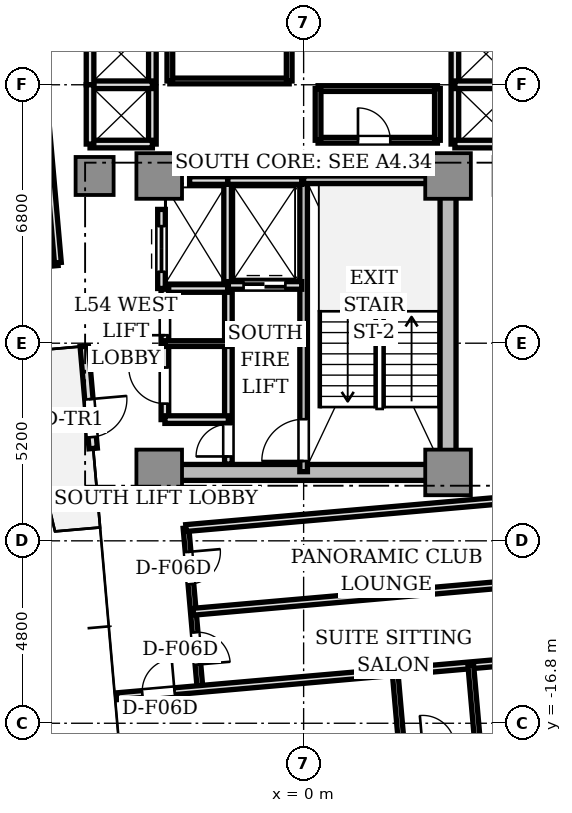
"""IFC4 building model, lengths in metres.
Left out: names, types, materials, properties, quantities, classifications, styles, units other than length and angle.
Written with IfcOpenShell. Run it as: python <this file> out.ifc"""

import sys

from ifc_helpers import new_model, si_unit, direction, frame, frame_2d, origin, origin_2d, place, context, subcontext, project, spatial, rectangle, extrude, source, transform, mapped, element, fill, save


model = new_model("IFC4")
c1 = context("Model", 3, precision=1e-05, world=origin(), true_north=direction((0.0, 1.0)))
c2 = subcontext(c1, "Body", "Model", "MODEL_VIEW")
j1 = project(units=[si_unit("LENGTHUNIT", "METRE"), si_unit("PLANEANGLEUNIT", "RADIAN")], contexts=[c1])
p1 = place(None, origin())
s1 = spatial("IfcSite", under=j1, at=p1, CompositionType="ELEMENT")
p2 = place(p1, origin())
s2 = spatial("IfcBuilding", under=s1, at=p2, CompositionType="ELEMENT")
p3 = place(p2, frame((0.0, 0.0, 195.3)))
s3 = spatial("IfcBuildingStorey", under=s2, at=p3, CompositionType="ELEMENT", Elevation=195.3)
p4 = place(p3, frame((-3.55, -10.2, 0.0), z_axis=(0.0, 0.0, 1.0), x_axis=(1.0, 0.0, 0.0)))
e1 = element("IfcWall", 1, at=p4, inside=s3, PredefinedType="SHEAR", context=c2, shape_type="SweptSolid", body=[
    extrude(rectangle(XDim=7.1, YDim=0.42, at=frame_2d((3.55, 0.0))), origin(), (0.0, 0.0, 1.0), 3.11),
])
p5 = place(p3, frame((3.8, -9.75, 0.0), z_axis=(0.0, 0.0, 1.0), x_axis=(0.0, 1.0, 0.0)))
e2 = element("IfcWall", 2, at=p5, inside=s3, PredefinedType="SHEAR", context=c2, shape_type="SweptSolid", body=[
    extrude(rectangle(XDim=6.9, YDim=0.42, at=frame_2d((3.45, 0.0))), origin(), (0.0, 0.0, 1.0), 3.11),
])
m1 = source(origin(), c2, "Body", "SweptSolid", [
    extrude(rectangle(XDim=1.2, YDim=1.2, at=origin_2d()), origin(), (0.0, 0.0, 1.0), 3.11),
])
for number, where, z_axis, x_axis in (
    (3, (-3.8, -2.4, 0.0), (0.0, 0.0, 1.0), (1.0, 0.0, 0.0)),
    (4, (3.8, -2.4, 0.0), (0.0, 0.0, 1.0), (1.0, 0.0, 0.0)),
    (5, (-3.8, -10.2, 0.0), (0.0, 0.0, 1.0), (1.0, 0.0, 0.0)),
    (6, (3.8, -10.2, 0.0), (0.0, 0.0, 1.0), (1.0, 0.0, 0.0)),
):
    element("IfcColumn", number, at=place(p3, frame(where, z_axis=z_axis, x_axis=x_axis)), inside=s3, PredefinedType="COLUMN", context=c2, shape_type="MappedRepresentation", body=[
        mapped(m1, transform((0.0, 0.0, 0.0), scale=1.0)),
    ])
m2 = source(origin(), c2, "Body", "SweptSolid", [
    extrude(rectangle(XDim=1.0, YDim=1.0, at=origin_2d()), origin(), (0.0, 0.0, 1.0), 3.11),
])
p6 = place(p3, frame((-5.5, -2.4, 0.0), z_axis=(0.0, 0.0, 1.0), x_axis=(1.0, 0.0, 0.0)))
e7 = element("IfcColumn", 7, at=p6, inside=s3, PredefinedType="COLUMN", context=c2, shape_type="MappedRepresentation", body=[
    mapped(m2, transform((0.0, 0.0, 0.0), scale=1.0)),
])
p7 = place(p3, frame((-5.772, -6.879, 0.0), z_axis=(0.0, 0.0, 1.0), x_axis=(0.087168071984, -0.996193619346, 0.0)))
e8 = element("IfcWall", 8, at=p7, inside=s3, PredefinedType="STANDARD", context=c2, shape_type="SweptSolid", body=[
    extrude(rectangle(XDim=2.7, YDim=0.22, at=frame_2d((1.35, 0.0))), origin(), (0.0, 0.0, 1.0), 3.11),
])
p8 = place(p7, frame((1.4, 0.0, 0.0)))
e9 = element("IfcOpeningElement", 9, at=p8, cuts=e8, PredefinedType="OPENING", context=c2, shape_type="SweptSolid", body=[
    extrude(rectangle(XDim=1.0, YDim=2.2, at=frame_2d((0.5, 1.1))), frame((0.0, 0.12, 0.0), z_axis=(0.0, -1.0, 0.0), x_axis=(1.0, 0.0, 0.0)), (0.0, 0.0, 1.0), 0.24),
])
p9 = place(p3, frame((0.0, -10.18, 0.0), z_axis=(0.0, 0.0, 1.0), x_axis=(0.0, 1.0, 0.0)))
e10 = element("IfcWall", 10, at=p9, inside=s3, PredefinedType="SOLIDWALL", context=c2, shape_type="SweptSolid", body=[
    extrude(rectangle(XDim=7.68, YDim=0.2, at=frame_2d((3.84, 0.0))), origin(), (0.0, 0.0, 1.0), 3.11),
])
p10 = place(p9, frame((0.28, 0.0, 0.0)))
e11 = element("IfcOpeningElement", 11, at=p10, cuts=e10, PredefinedType="OPENING", context=c2, shape_type="SweptSolid", body=[
    extrude(rectangle(XDim=1.1, YDim=2.15, at=frame_2d((0.55, 1.075))), frame((0.0, 0.11, 0.0), z_axis=(0.0, -1.0, 0.0), x_axis=(1.0, 0.0, 0.0)), (0.0, 0.0, 1.0), 0.22),
])
p11 = place(p3, frame((0.0, -2.5, 0.0), z_axis=(0.0, 0.0, 1.0), x_axis=(1.0, 0.0, 0.0)))
e12 = element("IfcWall", 12, at=p11, inside=s3, PredefinedType="SOLIDWALL", context=c2, shape_type="SweptSolid", body=[
    extrude(rectangle(XDim=3.72, YDim=0.2, at=frame_2d((1.86, 0.0))), origin(), (0.0, 0.0, 1.0), 3.11),
])
p12 = place(p3, frame((-1.98, -9.98, 0.0), z_axis=(0.0, 0.0, 1.0), x_axis=(0.0, 1.0, 0.0)))
e13 = element("IfcWall", 13, at=p12, inside=s3, PredefinedType="SOLIDWALL", context=c2, shape_type="SweptSolid", body=[
    extrude(rectangle(XDim=4.66, YDim=0.2, at=frame_2d((2.33, 0.0))), origin(), (0.0, 0.0, 1.0), 2.66),
])
p13 = place(p12, frame((0.2, 0.0, 0.0)))
e14 = element("IfcOpeningElement", 14, at=p13, cuts=e13, PredefinedType="OPENING", context=c2, shape_type="SweptSolid", body=[
    extrude(rectangle(XDim=0.85, YDim=2.1, at=frame_2d((0.425, 1.05))), frame((0.0, 0.11, 0.0), z_axis=(0.0, -1.0, 0.0), x_axis=(1.0, 0.0, 0.0)), (0.0, 0.0, 1.0), 0.22),
])
p14 = place(p3, frame((-2.0, -5.28, 0.0), z_axis=(0.0, 0.0, 1.0), x_axis=(0.0, 1.0, 0.0)))
e15 = element("IfcWall", 15, at=p14, inside=s3, PredefinedType="SOLIDWALL", context=c2, shape_type="SweptSolid", body=[
    extrude(rectangle(XDim=2.78, YDim=0.2, at=frame_2d((1.39, 0.0))), origin(), (0.0, 0.0, 1.0), 2.66),
])
p15 = place(p3, frame((-2.0, -2.52, 0.0), z_axis=(0.0, 0.0, 1.0), x_axis=(1.0, 0.0, 0.0)))
e16 = element("IfcWall", 16, at=p15, inside=s3, PredefinedType="SOLIDWALL", context=c2, shape_type="SweptSolid", body=[
    extrude(rectangle(XDim=1.95, YDim=0.2, at=frame_2d((0.975, 0.0))), origin(), (0.0, 0.0, 1.0), 2.66),
])
p16 = place(p3, frame((-1.98, -5.28, 0.0), z_axis=(0.0, 0.0, 1.0), x_axis=(1.0, 0.0, 0.0)))
e17 = element("IfcWall", 17, at=p16, inside=s3, PredefinedType="SOLIDWALL", context=c2, shape_type="SweptSolid", body=[
    extrude(rectangle(XDim=1.93, YDim=0.2, at=frame_2d((0.965, 0.0))), origin(), (0.0, 0.0, 1.0), 2.66),
])
p17 = place(p16, frame((0.4, 0.0, 0.0)))
e18 = element("IfcOpeningElement", 18, at=p17, cuts=e17, PredefinedType="OPENING", context=c2, shape_type="SweptSolid", body=[
    extrude(rectangle(XDim=1.1, YDim=2.2, at=frame_2d((0.55, 1.1))), frame((0.0, 0.11, 0.0), z_axis=(0.0, -1.0, 0.0), x_axis=(1.0, 0.0, 0.0)), (0.0, 0.0, 1.0), 0.22),
])
p18 = place(p3, frame((-3.0, -2.52, 0.0), z_axis=(0.0, 0.0, 1.0), x_axis=(1.0, 0.0, 0.0)))
e19 = element("IfcWall", 19, at=p18, inside=s3, PredefinedType="SOLIDWALL", context=c2, shape_type="SweptSolid", body=[
    extrude(rectangle(XDim=1.0, YDim=0.2, at=frame_2d((0.5, 0.0))), origin(), (0.0, 0.0, 1.0), 2.66),
])
p19 = place(p3, frame((-3.74, -5.36, 0.0), z_axis=(0.0, 0.0, 1.0), x_axis=(1.0, 0.0, 0.0)))
e20 = element("IfcWall", 20, at=p19, inside=s3, PredefinedType="SOLIDWALL", context=c2, shape_type="SweptSolid", body=[
    extrude(rectangle(XDim=1.74, YDim=0.2, at=frame_2d((0.87, 0.0))), origin(), (0.0, 0.0, 1.0), 2.66),
])
p20 = place(p3, frame((-3.74, -5.36, 0.0), z_axis=(0.0, 0.0, 1.0), x_axis=(0.0, 1.0, 0.0)))
e21 = element("IfcWall", 21, at=p20, inside=s3, PredefinedType="SOLIDWALL", context=c2, shape_type="SweptSolid", body=[
    extrude(rectangle(XDim=2.08, YDim=0.2, at=frame_2d((1.04, 0.0))), origin(), (0.0, 0.0, 1.0), 2.66),
])
p21 = place(p20, frame((0.44, 0.0, 0.0)))
e22 = element("IfcOpeningElement", 22, at=p21, cuts=e21, PredefinedType="OPENING", context=c2, shape_type="SweptSolid", body=[
    extrude(rectangle(XDim=1.2, YDim=2.2, at=frame_2d((0.6, 1.1))), frame((0.0, 0.11, 0.0), z_axis=(0.0, -1.0, 0.0), x_axis=(1.0, 0.0, 0.0)), (0.0, 0.0, 1.0), 0.22),
])
p22 = place(p3, frame((3.98, -1.56, 0.0), z_axis=(0.0, 0.0, 1.0), x_axis=(0.0, 1.0, 0.0)))
e23 = element("IfcWall", 23, at=p22, inside=s3, PredefinedType="SOLIDWALL", context=c2, shape_type="SweptSolid", body=[
    extrude(rectangle(XDim=3.12, YDim=0.2, at=frame_2d((1.56, 0.0))), origin(), (0.0, 0.0, 1.0), 2.28),
])
for number, where, z_axis, x_axis in (
    (24, (3.98, -1.56, 0.0), (0.0, 0.0, 1.0), (1.0, 0.0, 0.0)),
    (25, (3.98, 0.0, 0.0), (0.0, 0.0, 1.0), (1.0, 0.0, 0.0)),
):
    element("IfcWall", number, at=place(p3, frame(where, z_axis=z_axis, x_axis=x_axis)), inside=s3, PredefinedType="SOLIDWALL", context=c2, shape_type="SweptSolid", body=[
        extrude(rectangle(XDim=1.64, YDim=0.2, at=frame_2d((0.82, 0.0))), origin(), (0.0, 0.0, 1.0), 2.66),
    ])
p23 = place(p3, frame((-3.98, -1.56, 0.0), z_axis=(0.0, 0.0, 1.0), x_axis=(0.0, 1.0, 0.0)))
e26 = element("IfcWall", 26, at=p23, inside=s3, PredefinedType="SOLIDWALL", context=c2, shape_type="SweptSolid", body=[
    extrude(rectangle(XDim=3.12, YDim=0.2, at=frame_2d((1.56, 0.0))), origin(), (0.0, 0.0, 1.0), 2.28),
])
for number, where, z_axis, x_axis in (
    (27, (-5.62, -1.56, 0.0), (0.0, 0.0, 1.0), (1.0, 0.0, 0.0)),
    (28, (-5.62, 0.0, 0.0), (0.0, 0.0, 1.0), (1.0, 0.0, 0.0)),
):
    element("IfcWall", number, at=place(p3, frame(where, z_axis=z_axis, x_axis=x_axis)), inside=s3, PredefinedType="SOLIDWALL", context=c2, shape_type="SweptSolid", body=[
        extrude(rectangle(XDim=1.64, YDim=0.2, at=frame_2d((0.82, 0.0))), origin(), (0.0, 0.0, 1.0), 2.66),
    ])
for number, where, z_axis, x_axis in (
    (29, (-5.62, 0.0, 0.0), (0.0, 0.0, 1.0), (0.0, 1.0, 0.0)),
    (30, (-5.62, -1.56, 0.0), (0.0, 0.0, 1.0), (0.0, 1.0, 0.0)),
):
    element("IfcWall", number, at=place(p3, frame(where, z_axis=z_axis, x_axis=x_axis)), inside=s3, PredefinedType="SOLIDWALL", context=c2, shape_type="SweptSolid", body=[
        extrude(rectangle(XDim=1.56, YDim=0.2, at=frame_2d((0.78, 0.0))), origin(), (0.0, 0.0, 1.0), 2.66),
    ])
p24 = place(p3, frame((-3.65, -8.81, 0.0), z_axis=(0.0, 0.0, 1.0), x_axis=(0.0, 1.0, 0.0)))
e31 = element("IfcWall", 31, at=p24, inside=s3, PredefinedType="SOLIDWALL", context=c2, shape_type="SweptSolid", body=[
    extrude(rectangle(XDim=3.43, YDim=0.2, at=frame_2d((1.715, 0.0))), origin(), (0.0, 0.0, 1.0), 2.66),
])
p25 = place(p24, frame((0.42, 0.0, 0.0)))
e32 = element("IfcOpeningElement", 32, at=p25, cuts=e31, PredefinedType="OPENING", context=c2, shape_type="SweptSolid", body=[
    extrude(rectangle(XDim=0.95, YDim=2.15, at=frame_2d((0.475, 1.075))), frame((0.0, 0.11, 0.0), z_axis=(0.0, -1.0, 0.0), x_axis=(1.0, 0.0, 0.0)), (0.0, 0.0, 1.0), 0.22),
])
p26 = place(p24, frame((2.22, 0.0, 0.0)))
e33 = element("IfcOpeningElement", 33, at=p26, cuts=e31, PredefinedType="OPENING", context=c2, shape_type="SweptSolid", body=[
    extrude(rectangle(XDim=0.85, YDim=2.1, at=frame_2d((0.425, 1.05))), frame((0.0, 0.11, 0.0), z_axis=(0.0, -1.0, 0.0), x_axis=(1.0, 0.0, 0.0)), (0.0, 0.0, 1.0), 0.22),
])
p27 = place(p3, frame((-3.65, -8.81, 0.0), z_axis=(0.0, 0.0, 1.0), x_axis=(1.0, 0.0, 0.0)))
e34 = element("IfcWall", 34, at=p27, inside=s3, PredefinedType="SOLIDWALL", context=c2, shape_type="SweptSolid", body=[
    extrude(rectangle(XDim=1.67, YDim=0.2, at=frame_2d((0.835, 0.0))), origin(), (0.0, 0.0, 1.0), 2.66),
])
p28 = place(p3, frame((-3.65, -6.81, 0.0), z_axis=(0.0, 0.0, 1.0), x_axis=(1.0, 0.0, 0.0)))
e35 = element("IfcWall", 35, at=p28, inside=s3, PredefinedType="PARTITIONING", context=c2, shape_type="SweptSolid", body=[
    extrude(rectangle(XDim=1.67, YDim=0.15, at=frame_2d((0.835, 0.0))), origin(), (0.0, 0.0, 1.0), 2.66),
])
p29 = place(p3, frame((-3.52, 0.1, 0.0), z_axis=(0.0, 0.0, 1.0), x_axis=(1.0, 0.0, 0.0)))
e36 = element("IfcWall", 36, at=p29, inside=s3, PredefinedType="PARTITIONING", context=c2, shape_type="SweptSolid", body=[
    extrude(rectangle(XDim=3.14, YDim=0.15, at=frame_2d((1.57, 0.0))), origin(), (0.0, 0.0, 1.0), 2.66),
])
p30 = place(p3, frame((-3.52, 0.1, 0.0), z_axis=(0.0, 0.0, 1.0), x_axis=(0.0, 1.0, 0.0)))
e37 = element("IfcWall", 37, at=p30, inside=s3, PredefinedType="PARTITIONING", context=c2, shape_type="SweptSolid", body=[
    extrude(rectangle(XDim=1.36, YDim=0.15, at=frame_2d((0.68, 0.0))), origin(), (0.0, 0.0, 1.0), 2.28),
])
p31 = place(p3, frame((-0.38, 0.1, 0.0), z_axis=(0.0, 0.0, 1.0), x_axis=(0.0, 1.0, 0.0)))
e38 = element("IfcWall", 38, at=p31, inside=s3, PredefinedType="PARTITIONING", context=c2, shape_type="SweptSolid", body=[
    extrude(rectangle(XDim=1.36, YDim=0.15, at=frame_2d((0.68, 0.0))), origin(), (0.0, 0.0, 1.0), 2.66),
])
p32 = place(p3, frame((0.38, -0.1, 0.0), z_axis=(0.0, 0.0, 1.0), x_axis=(1.0, 0.0, 0.0)))
e39 = element("IfcWall", 39, at=p32, inside=s3, PredefinedType="PARTITIONING", context=c2, shape_type="SweptSolid", body=[
    extrude(rectangle(XDim=3.14, YDim=0.15, at=frame_2d((1.57, 0.0))), origin(), (0.0, 0.0, 1.0), 2.66),
])
p33 = place(p3, frame((0.38, -1.46, 0.0), z_axis=(0.0, 0.0, 1.0), x_axis=(1.0, 0.0, 0.0)))
e40 = element("IfcWall", 40, at=p33, inside=s3, PredefinedType="PARTITIONING", context=c2, shape_type="SweptSolid", body=[
    extrude(rectangle(XDim=3.14, YDim=0.15, at=frame_2d((1.57, 0.0))), origin(), (0.0, 0.0, 1.0), 2.66),
])
p34 = place(p33, frame((1.05, 0.0, 0.0)))
e41 = element("IfcOpeningElement", 41, at=p34, cuts=e40, PredefinedType="OPENING", context=c2, shape_type="SweptSolid", body=[
    extrude(rectangle(XDim=0.85, YDim=2.1, at=frame_2d((0.425, 1.05))), frame((0.0, 0.085, 0.0), z_axis=(0.0, -1.0, 0.0), x_axis=(1.0, 0.0, 0.0)), (0.0, 0.0, 1.0), 0.17),
])
p35 = place(p3, frame((0.38, -1.46, 0.0), z_axis=(0.0, 0.0, 1.0), x_axis=(0.0, 1.0, 0.0)))
e42 = element("IfcWall", 42, at=p35, inside=s3, PredefinedType="PARTITIONING", context=c2, shape_type="SweptSolid", body=[
    extrude(rectangle(XDim=1.36, YDim=0.15, at=frame_2d((0.68, 0.0))), origin(), (0.0, 0.0, 1.0), 2.66),
])
p36 = place(p3, frame((3.52, -1.46, 0.0), z_axis=(0.0, 0.0, 1.0), x_axis=(0.0, 1.0, 0.0)))
e43 = element("IfcWall", 43, at=p36, inside=s3, PredefinedType="PARTITIONING", context=c2, shape_type="SweptSolid", body=[
    extrude(rectangle(XDim=1.36, YDim=0.15, at=frame_2d((0.68, 0.0))), origin(), (0.0, 0.0, 1.0), 2.28),
])
p37 = place(p3, frame((-6.467, -4.681, 0.0), z_axis=(0.0, 0.0, 1.0), x_axis=(-0.996195452949, -0.087147114263, 0.0)))
e44 = element("IfcWall", 44, at=p37, inside=s3, PredefinedType="PARTITIONING", context=c2, shape_type="SweptSolid", body=[
    extrude(rectangle(XDim=8.55, YDim=0.15, at=frame_2d((4.275, 0.0))), origin(), (0.0, 0.0, 1.0), 2.66),
])
p38 = place(p37, frame((1.491, 0.0, 0.0)))
e45 = element("IfcOpeningElement", 45, at=p38, cuts=e44, PredefinedType="OPENING", context=c2, shape_type="SweptSolid", body=[
    extrude(rectangle(XDim=0.85, YDim=2.1, at=frame_2d((0.425, 1.05))), frame((0.0, 0.085, 0.0), z_axis=(0.0, -1.0, 0.0), x_axis=(1.0, 0.0, 0.0)), (0.0, 0.0, 1.0), 0.17),
])
p39 = place(p37, frame((4.792, 0.0, 0.0)))
e46 = element("IfcOpeningElement", 46, at=p39, cuts=e44, PredefinedType="OPENING", context=c2, shape_type="SweptSolid", body=[
    extrude(rectangle(XDim=0.85, YDim=2.1, at=frame_2d((0.425, 1.05))), frame((0.0, 0.085, 0.0), z_axis=(0.0, -1.0, 0.0), x_axis=(1.0, 0.0, 0.0)), (0.0, 0.0, 1.0), 0.17),
])
p40 = place(p3, frame((-7.373, 5.679, 0.0), z_axis=(0.0, 0.0, 1.0), x_axis=(0.087163455754, -0.996194023261, 0.0)))
e47 = element("IfcWall", 47, at=p40, inside=s3, PredefinedType="PARTITIONING", context=c2, shape_type="SweptSolid", body=[
    extrude(rectangle(XDim=10.4, YDim=0.18, at=frame_2d((5.2, 0.0))), origin(), (0.0, 0.0, 1.0), 2.66),
])
p41 = place(p3, frame((-3.095, -11.664, 0.0), z_axis=(0.0, 0.0, 1.0), x_axis=(0.087142722004, -0.996195837173, 0.0)))
e48 = element("IfcWall", 48, at=p41, inside=s3, PredefinedType="PARTITIONING", context=c2, shape_type="SweptSolid", body=[
    extrude(rectangle(XDim=4.25, YDim=0.15, at=frame_2d((2.125, 0.0))), origin(), (0.0, 0.0, 1.0), 2.66),
])
p42 = place(p41, frame((0.63, 0.0, 0.0)))
e49 = element("IfcOpeningElement", 49, at=p42, cuts=e48, PredefinedType="OPENING", context=c2, shape_type="SweptSolid", body=[
    extrude(rectangle(XDim=0.85, YDim=2.1, at=frame_2d((0.425, 1.05))), frame((0.0, 0.085, 0.0), z_axis=(0.0, -1.0, 0.0), x_axis=(1.0, 0.0, 0.0)), (0.0, 0.0, 1.0), 0.17),
])
p43 = place(p41, frame((2.755, 0.0, 0.0)))
e50 = element("IfcOpeningElement", 50, at=p43, cuts=e48, PredefinedType="OPENING", context=c2, shape_type="SweptSolid", body=[
    extrude(rectangle(XDim=0.85, YDim=2.1, at=frame_2d((0.425, 1.05))), frame((0.0, 0.085, 0.0), z_axis=(0.0, -1.0, 0.0), x_axis=(1.0, 0.0, 0.0)), (0.0, 0.0, 1.0), 0.17),
])
p44 = place(p3, frame((-3.095, -11.664, 0.0), z_axis=(0.0, 0.0, 1.0), x_axis=(0.996196061386, 0.087140158824, 0.0)))
e51 = element("IfcWall", 51, at=p44, inside=s3, PredefinedType="PARTITIONING", context=c2, shape_type="SweptSolid", body=[
    extrude(rectangle(XDim=10.4, YDim=0.18, at=frame_2d((5.2, 0.0))), origin(), (0.0, 0.0, 1.0), 2.66),
])
p45 = place(p3, frame((-2.903, -13.866, 0.0), z_axis=(0.0, 0.0, 1.0), x_axis=(0.996194201607, 0.087161417409, 0.0)))
e52 = element("IfcWall", 52, at=p45, inside=s3, PredefinedType="PARTITIONING", context=c2, shape_type="SweptSolid", body=[
    extrude(rectangle(XDim=10.4, YDim=0.18, at=frame_2d((5.2, 0.0))), origin(), (0.0, 0.0, 1.0), 2.66),
])
p46 = place(p3, frame((-4.917, -16.09, 0.0), z_axis=(0.0, 0.0, 1.0), x_axis=(0.996196619285, 0.087133780622, 0.0)))
e53 = element("IfcWall", 53, at=p46, inside=s3, PredefinedType="PARTITIONING", context=c2, shape_type="SweptSolid", body=[
    extrude(rectangle(XDim=12.6, YDim=0.18, at=frame_2d((6.3, 0.0))), origin(), (0.0, 0.0, 1.0), 2.66),
])
p47 = place(p46, frame((0.675, 0.0, 0.0)))
e54 = element("IfcOpeningElement", 54, at=p47, cuts=e53, PredefinedType="OPENING", context=c2, shape_type="SweptSolid", body=[
    extrude(rectangle(XDim=0.85, YDim=2.1, at=frame_2d((0.425, 1.05))), frame((0.0, 0.1, 0.0), z_axis=(0.0, -1.0, 0.0), x_axis=(1.0, 0.0, 0.0)), (0.0, 0.0, 1.0), 0.2),
])
for number, where, z_axis, x_axis in (
    (55, (4.398, -15.275, 0.0), (0.0, 0.0, 1.0), (0.087, -0.996, 0.0)),
    (56, (2.406, -15.449, 0.0), (0.0, 0.0, 1.0), (0.087, -0.996, 0.0)),
):
    element("IfcWall", number, at=place(p3, frame(where, z_axis=z_axis, x_axis=x_axis)), inside=s3, PredefinedType="PARTITIONING", context=c2, shape_type="SweptSolid", body=[
        extrude(rectangle(XDim=2.05, YDim=0.15, at=frame_2d((1.025, 0.0))), origin(), (0.0, 0.0, 1.0), 2.66),
    ])
m3 = source(origin(), c2, "Body", "SweptSolid", [
    extrude(rectangle(XDim=1.0, YDim=0.05, at=origin_2d()), origin(), (0.0, 0.0, 1.0), 2.2),
])
p48 = place(p8, frame((0.5, 0.0, 0.0)))
e57 = element("IfcDoor", 57, at=p48, inside=s3, OperationType="SINGLE_SWING_LEFT", PredefinedType="DOOR", context=c2, shape_type="MappedRepresentation", body=[
    mapped(m3, transform((0.0, 0.0, 0.0), scale=1.0)),
])
fill(e9, e57)
m4 = source(origin(), c2, "Body", "SweptSolid", [
    extrude(rectangle(XDim=1.1, YDim=0.05, at=origin_2d()), origin(), (0.0, 0.0, 1.0), 2.15),
])
p49 = place(p10, frame((0.55, 0.0, 0.0)))
e58 = element("IfcDoor", 58, at=p49, inside=s3, OperationType="SINGLE_SWING_LEFT", PredefinedType="DOOR", context=c2, shape_type="MappedRepresentation", body=[
    mapped(m4, transform((0.0, 0.0, 0.0), scale=1.0)),
])
fill(e11, e58)
m5 = source(origin(), c2, "Body", "SweptSolid", [
    extrude(rectangle(XDim=0.85, YDim=0.05, at=origin_2d()), origin(), (0.0, 0.0, 1.0), 2.1),
])
p50 = place(p13, frame((0.425, 0.0, 0.0)))
e59 = element("IfcDoor", 59, at=p50, inside=s3, OperationType="SINGLE_SWING_LEFT", PredefinedType="DOOR", context=c2, shape_type="MappedRepresentation", body=[
    mapped(m5, transform((0.0, 0.0, 0.0), scale=1.0)),
])
fill(e14, e59)
m6 = source(origin(), c2, "Body", "SweptSolid", [
    extrude(rectangle(XDim=1.1, YDim=0.05, at=origin_2d()), origin(), (0.0, 0.0, 1.0), 2.2),
])
p51 = place(p17, frame((0.55, 0.0, 0.0)))
e60 = element("IfcDoor", 60, at=p51, inside=s3, OperationType="DOUBLE_DOOR_SLIDING", PredefinedType="DOOR", context=c2, shape_type="MappedRepresentation", body=[
    mapped(m6, transform((0.0, 0.0, 0.0), scale=1.0)),
])
fill(e18, e60)
m7 = source(origin(), c2, "Body", "SweptSolid", [
    extrude(rectangle(XDim=1.2, YDim=0.05, at=origin_2d()), origin(), (0.0, 0.0, 1.0), 2.2),
])
p52 = place(p21, frame((0.6, 0.0, 0.0)))
e61 = element("IfcDoor", 61, at=p52, inside=s3, OperationType="DOUBLE_DOOR_SLIDING", PredefinedType="DOOR", context=c2, shape_type="MappedRepresentation", body=[
    mapped(m7, transform((0.0, 0.0, 0.0), scale=1.0)),
])
fill(e22, e61)
m8 = source(origin(), c2, "Body", "SweptSolid", [
    extrude(rectangle(XDim=0.95, YDim=0.05, at=origin_2d()), origin(), (0.0, 0.0, 1.0), 2.15),
])
p53 = place(p25, frame((0.475, 0.0, 0.0)))
e62 = element("IfcDoor", 62, at=p53, inside=s3, OperationType="SINGLE_SWING_RIGHT", PredefinedType="DOOR", context=c2, shape_type="MappedRepresentation", body=[
    mapped(m8, transform((0.0, 0.0, 0.0), scale=1.0)),
])
fill(e32, e62)
p54 = place(p26, frame((0.425, 0.0, 0.0)))
e63 = element("IfcDoor", 63, at=p54, inside=s3, OperationType="SINGLE_SWING_LEFT", PredefinedType="DOOR", context=c2, shape_type="MappedRepresentation", body=[
    mapped(m5, transform((0.0, 0.0, 0.0), scale=1.0)),
])
fill(e33, e63)
p55 = place(p34, frame((0.425, 0.0, 0.0)))
e64 = element("IfcDoor", 64, at=p55, inside=s3, OperationType="SINGLE_SWING_LEFT", PredefinedType="DOOR", context=c2, shape_type="MappedRepresentation", body=[
    mapped(m5, transform((0.0, 0.0, 0.0), scale=1.0)),
])
fill(e41, e64)
p56 = place(p42, frame((0.425, 0.0, 0.0)))
e65 = element("IfcDoor", 65, at=p56, inside=s3, OperationType="SINGLE_SWING_LEFT", PredefinedType="DOOR", context=c2, shape_type="MappedRepresentation", body=[
    mapped(m5, transform((0.0, 0.0, 0.0), scale=1.0)),
])
fill(e49, e65)
p57 = place(p43, frame((0.425, 0.0, 0.0)))
e66 = element("IfcDoor", 66, at=p57, inside=s3, OperationType="SINGLE_SWING_RIGHT", PredefinedType="DOOR", context=c2, shape_type="MappedRepresentation", body=[
    mapped(m5, transform((0.0, 0.0, 0.0), scale=1.0)),
])
fill(e50, e66)
p58 = place(p47, frame((0.425, 0.0, 0.0)))
e67 = element("IfcDoor", 67, at=p58, inside=s3, OperationType="SINGLE_SWING_RIGHT", PredefinedType="DOOR", context=c2, shape_type="MappedRepresentation", body=[
    mapped(m5, transform((0.0, 0.0, 0.0), scale=1.0)),
])
fill(e54, e67)
save(model, sys.argv[1])
